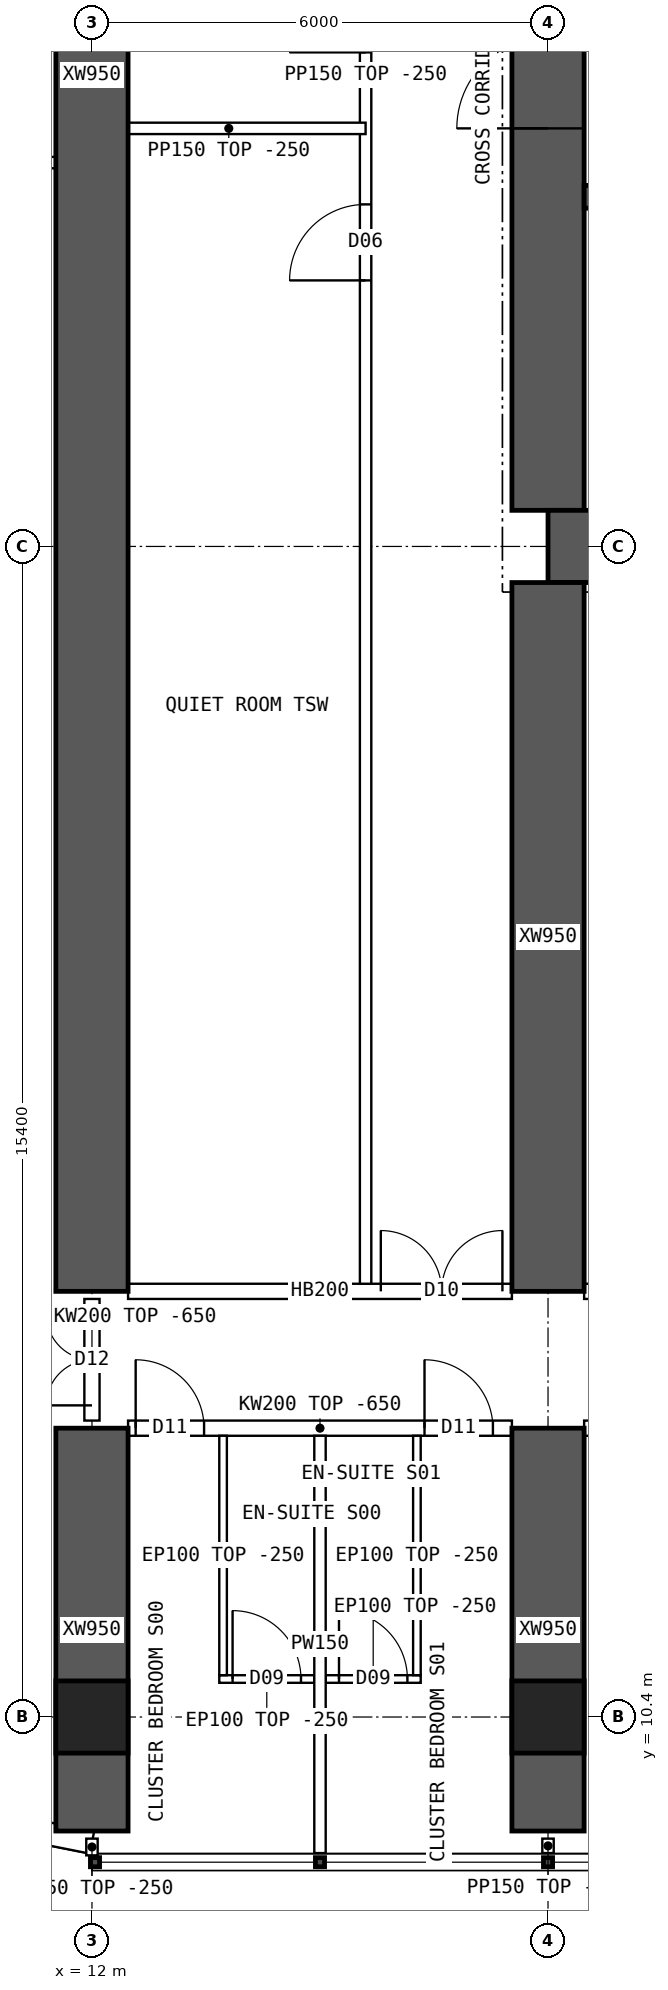
"""IFC4 building model, lengths in metres.
Left out: names, types, materials, properties, quantities, classifications, styles, units other than length and angle.
Written with IfcOpenShell. Run it as: python <this file> out.ifc"""

import sys

from ifc_helpers import new_model, si_unit, direction, frame, frame_2d, origin, origin_2d, place, context, subcontext, project, spatial, polyline, rectangle, hollow_rectangle, outline, extrude, element, fill, save


model = new_model("IFC4")
c1 = context("Model", 3, precision=1e-05, world=origin(), true_north=direction((0.0, 1.0)))
c2 = subcontext(c1, "Body", "Model", "MODEL_VIEW")
j1 = project(units=[si_unit("LENGTHUNIT", "METRE"), si_unit("PLANEANGLEUNIT", "RADIAN")], contexts=[c1])
p1 = place(None, origin())
s1 = spatial("IfcSite", under=j1, at=p1, CompositionType="ELEMENT")
p2 = place(p1, origin())
s2 = spatial("IfcBuilding", under=s1, at=p2, CompositionType="ELEMENT")
p3 = place(p2, frame((0.0, 0.0, 114.4)))
s3 = spatial("IfcBuildingStorey", under=s2, at=p3, CompositionType="ELEMENT", Elevation=114.4)
for number, where, z_axis, x_axis in (
    (1, (12.0, 10.4, 0.0), (0.0, 0.0, 1.0), (1.0, 0.0, 0.0)),
    (2, (18.0, 10.4, 0.0), (0.0, 0.0, 1.0), (1.0, 0.0, 0.0)),
):
    element("IfcColumn", number, at=place(p3, frame(where, z_axis=z_axis, x_axis=x_axis)), inside=s3, PredefinedType="COLUMN", context=c2, shape_type="SweptSolid", body=[
        extrude(hollow_rectangle(XDim=0.95, YDim=0.95, WallThickness=0.095, at=origin_2d()), origin(), (0.0, 0.0, 1.0), 3.75),
    ])
p4 = place(p3, frame((18.0, 25.8, 0.0), z_axis=(0.0, 0.0, 1.0), x_axis=(1.0, 0.0, 0.0)))
e3 = element("IfcWall", 3, at=p4, inside=s3, PredefinedType="SHEAR", context=c2, shape_type="SweptSolid", body=[
    extrude(rectangle(XDim=48.0, YDim=0.95, at=frame_2d((24.0, 0.0))), origin(), (0.0, 0.0, 1.0), 3.75),
])
p5 = place(p3, frame((18.0, 26.275, 0.0), z_axis=(0.0, 0.0, 1.0), x_axis=(0.0, 1.0, 0.0)))
e4 = element("IfcWall", 4, at=p5, inside=s3, PredefinedType="SHEAR", context=c2, shape_type="SweptSolid", body=[
    extrude(rectangle(XDim=11.45, YDim=0.95, at=frame_2d((5.725, 0.0))), origin(), (0.0, 0.0, 1.0), 3.75),
])
p6 = place(p5, frame((5.025, 0.0, 0.0)))
e5 = element("IfcOpeningElement", 5, at=p6, cuts=e4, PredefinedType="OPENING", context=c2, shape_type="SweptSolid", body=[
    extrude(rectangle(XDim=1.2, YDim=2.1, at=frame_2d((0.6, 1.05))), frame((0.0, 0.485, 0.0), z_axis=(0.0, -1.0, 0.0), x_axis=(1.0, 0.0, 0.0)), (0.0, 0.0, 1.0), 0.97),
])
p7 = place(p3, frame((18.475, 30.4, 0.0), z_axis=(0.0, 0.0, 1.0), x_axis=(1.0, 0.0, 0.0)))
e6 = element("IfcWall", 6, at=p7, inside=s3, PredefinedType="SHEAR", context=c2, shape_type="SweptSolid", body=[
    extrude(rectangle(XDim=47.05, YDim=0.3, at=frame_2d((23.525, 0.0))), origin(), (0.0, 0.0, 1.0), 3.75),
])
p8 = place(p7, frame((0.4, 0.0, 0.0)))
e7 = element("IfcOpeningElement", 7, at=p8, cuts=e6, PredefinedType="OPENING", context=c2, shape_type="SweptSolid", body=[
    extrude(rectangle(XDim=1.0, YDim=2.1, at=frame_2d((0.5, 1.05))), frame((0.0, 0.16, 0.0), z_axis=(0.0, -1.0, 0.0), x_axis=(1.0, 0.0, 0.0)), (0.0, 0.0, 1.0), 0.32),
])
p9 = place(p7, frame((45.65, 0.0, 0.0)))
e8 = element("IfcOpeningElement", 8, at=p9, cuts=e6, PredefinedType="OPENING", context=c2, shape_type="SweptSolid", body=[
    extrude(rectangle(XDim=1.0, YDim=2.1, at=frame_2d((0.5, 1.05))), frame((0.0, 0.16, 0.0), z_axis=(0.0, -1.0, 0.0), x_axis=(1.0, 0.0, 0.0)), (0.0, 0.0, 1.0), 0.32),
])
p10 = place(p7, frame((8.275, 0.0, 0.0)))
e9 = element("IfcOpeningElement", 9, at=p10, cuts=e6, PredefinedType="OPENING", context=c2, shape_type="SweptSolid", body=[
    extrude(rectangle(XDim=1.1, YDim=2.1, at=frame_2d((0.55, 1.05))), frame((0.0, 0.16, 0.0), z_axis=(0.0, -1.0, 0.0), x_axis=(1.0, 0.0, 0.0)), (0.0, 0.0, 1.0), 0.32),
])
p11 = place(p7, frame((10.875, 0.0, 0.0)))
e10 = element("IfcOpeningElement", 10, at=p11, cuts=e6, PredefinedType="OPENING", context=c2, shape_type="SweptSolid", body=[
    extrude(rectangle(XDim=1.1, YDim=2.1, at=frame_2d((0.55, 1.05))), frame((0.0, 0.16, 0.0), z_axis=(0.0, -1.0, 0.0), x_axis=(1.0, 0.0, 0.0)), (0.0, 0.0, 1.0), 0.32),
])
p12 = place(p7, frame((13.475, 0.0, 0.0)))
e11 = element("IfcOpeningElement", 11, at=p12, cuts=e6, PredefinedType="OPENING", context=c2, shape_type="SweptSolid", body=[
    extrude(rectangle(XDim=1.1, YDim=2.1, at=frame_2d((0.55, 1.05))), frame((0.0, 0.16, 0.0), z_axis=(0.0, -1.0, 0.0), x_axis=(1.0, 0.0, 0.0)), (0.0, 0.0, 1.0), 0.32),
])
p13 = place(p7, frame((16.075, 0.0, 0.0)))
e12 = element("IfcOpeningElement", 12, at=p13, cuts=e6, PredefinedType="OPENING", context=c2, shape_type="SweptSolid", body=[
    extrude(rectangle(XDim=1.1, YDim=2.1, at=frame_2d((0.55, 1.05))), frame((0.0, 0.16, 0.0), z_axis=(0.0, -1.0, 0.0), x_axis=(1.0, 0.0, 0.0)), (0.0, 0.0, 1.0), 0.32),
])
p14 = place(p7, frame((18.85, 0.0, 0.0)))
e13 = element("IfcOpeningElement", 13, at=p14, cuts=e6, PredefinedType="OPENING", context=c2, shape_type="SweptSolid", body=[
    extrude(rectangle(XDim=0.9, YDim=2.1, at=frame_2d((0.45, 1.05))), frame((0.0, 0.16, 0.0), z_axis=(0.0, -1.0, 0.0), x_axis=(1.0, 0.0, 0.0)), (0.0, 0.0, 1.0), 0.32),
])
p15 = place(p7, frame((30.142, 0.0, 0.0)))
e14 = element("IfcOpeningElement", 14, at=p15, cuts=e6, PredefinedType="OPENING", context=c2, shape_type="SweptSolid", body=[
    extrude(rectangle(XDim=1.1, YDim=2.1, at=frame_2d((0.55, 1.05))), frame((0.0, 0.16, 0.0), z_axis=(0.0, -1.0, 0.0), x_axis=(1.0, 0.0, 0.0)), (0.0, 0.0, 1.0), 0.32),
])
p16 = place(p7, frame((33.675, 0.0, 0.0)))
e15 = element("IfcOpeningElement", 15, at=p16, cuts=e6, PredefinedType="OPENING", context=c2, shape_type="SweptSolid", body=[
    extrude(rectangle(XDim=1.1, YDim=2.1, at=frame_2d((0.55, 1.05))), frame((0.0, 0.16, 0.0), z_axis=(0.0, -1.0, 0.0), x_axis=(1.0, 0.0, 0.0)), (0.0, 0.0, 1.0), 0.32),
])
p17 = place(p7, frame((37.208, 0.0, 0.0)))
e16 = element("IfcOpeningElement", 16, at=p17, cuts=e6, PredefinedType="OPENING", context=c2, shape_type="SweptSolid", body=[
    extrude(rectangle(XDim=1.1, YDim=2.1, at=frame_2d((0.55, 1.05))), frame((0.0, 0.16, 0.0), z_axis=(0.0, -1.0, 0.0), x_axis=(1.0, 0.0, 0.0)), (0.0, 0.0, 1.0), 0.32),
])
p18 = place(p3, frame((12.0, 8.9, 0.0), z_axis=(0.0, 0.0, 1.0), x_axis=(0.0, 1.0, 0.0)))
e17 = element("IfcWall", 17, at=p18, inside=s3, PredefinedType="SHEAR", context=c2, shape_type="SweptSolid", body=[
    extrude(rectangle(XDim=5.3, YDim=0.95, at=frame_2d((2.65, 0.0))), origin(), (0.0, 0.0, 1.0), 3.75),
])
p19 = place(p3, frame((12.0, 16.0, 0.0), z_axis=(0.0, 0.0, 1.0), x_axis=(0.0, 1.0, 0.0)))
e18 = element("IfcWall", 18, at=p19, inside=s3, PredefinedType="SHEAR", context=c2, shape_type="SweptSolid", body=[
    extrude(rectangle(XDim=32.0, YDim=0.95, at=frame_2d((16.0, 0.0))), origin(), (0.0, 0.0, 1.0), 3.75),
])
p20 = place(p3, frame((18.0, 8.9, 0.0), z_axis=(0.0, 0.0, 1.0), x_axis=(0.0, 1.0, 0.0)))
e19 = element("IfcWall", 19, at=p20, inside=s3, PredefinedType="SHEAR", context=c2, shape_type="SweptSolid", body=[
    extrude(rectangle(XDim=5.3, YDim=0.95, at=frame_2d((2.65, 0.0))), origin(), (0.0, 0.0, 1.0), 3.75),
])
p21 = place(p3, frame((18.0, 16.0, 0.0), z_axis=(0.0, 0.0, 1.0), x_axis=(0.0, 1.0, 0.0)))
e20 = element("IfcWall", 20, at=p21, inside=s3, PredefinedType="SHEAR", context=c2, shape_type="SweptSolid", body=[
    extrude(rectangle(XDim=9.325, YDim=0.95, at=frame_2d((4.663, 0.0))), origin(), (0.0, 0.0, 1.0), 3.75),
])
p22 = place(p3, frame((8.843, 9.378, 0.0), z_axis=(0.0, 0.0, 1.0), x_axis=(0.980787251524, -0.195080412259, 0.0)))
e21 = element("IfcWall", 21, at=p22, inside=s3, PredefinedType="SOLIDWALL", context=c2, shape_type="SweptSolid", body=[
    extrude(outline(polyline([(-0.03, -0.15), (3.249, -0.15), (3.189, 0.15), (0.03, 0.15), (-0.03, -0.15)])), origin(), (0.0, 0.0, 1.0), 3.5),
])
p23 = place(p22, frame((0.909, 0.0, 0.9)))
e22 = element("IfcOpeningElement", 22, at=p23, cuts=e21, PredefinedType="OPENING", context=c2, shape_type="SweptSolid", body=[
    extrude(rectangle(XDim=1.4, YDim=1.8, at=frame_2d((0.7, 0.9))), frame((0.0, 0.16, 0.0), z_axis=(0.0, -1.0, 0.0), x_axis=(1.0, 0.0, 0.0)), (0.0, 0.0, 1.0), 0.32),
])
p24 = place(p3, frame((12.475, 14.2, 0.0), z_axis=(0.0, 0.0, 1.0), x_axis=(1.0, 0.0, 0.0)))
e23 = element("IfcWall", 23, at=p24, inside=s3, PredefinedType="SOLIDWALL", context=c2, shape_type="SweptSolid", body=[
    extrude(outline(polyline([(0.0, 0.0), (5.05, 0.0), (5.05, 3.1), (0.0, 3.1), (0.0, 0.0)])), frame((0.0, 0.1, 0.0), z_axis=(0.0, -1.0, 0.0), x_axis=(1.0, 0.0, 0.0)), (0.0, 0.0, 1.0), 0.2),
])
p25 = place(p24, frame((0.1, 0.0, 0.0)))
e24 = element("IfcOpeningElement", 24, at=p25, cuts=e23, PredefinedType="OPENING", context=c2, shape_type="SweptSolid", body=[
    extrude(rectangle(XDim=0.9, YDim=2.1, at=frame_2d((0.45, 1.05))), frame((0.0, 0.11, 0.0), z_axis=(0.0, -1.0, 0.0), x_axis=(1.0, 0.0, 0.0)), (0.0, 0.0, 1.0), 0.22),
])
p26 = place(p24, frame((3.9, 0.0, 0.0)))
e25 = element("IfcOpeningElement", 25, at=p26, cuts=e23, PredefinedType="OPENING", context=c2, shape_type="SweptSolid", body=[
    extrude(rectangle(XDim=0.9, YDim=2.1, at=frame_2d((0.45, 1.05))), frame((0.0, 0.11, 0.0), z_axis=(0.0, -1.0, 0.0), x_axis=(1.0, 0.0, 0.0)), (0.0, 0.0, 1.0), 0.22),
])
p27 = place(p3, frame((12.475, 16.0, 0.0), z_axis=(0.0, 0.0, 1.0), x_axis=(1.0, 0.0, 0.0)))
e26 = element("IfcWall", 26, at=p27, inside=s3, PredefinedType="SOLIDWALL", context=c2, shape_type="SweptSolid", body=[
    extrude(rectangle(XDim=5.05, YDim=0.2, at=frame_2d((2.525, 0.0))), origin(), (0.0, 0.0, 1.0), 3.5),
])
p28 = place(p27, frame((3.325, 0.0, 0.0)))
e27 = element("IfcOpeningElement", 27, at=p28, cuts=e26, PredefinedType="OPENING", context=c2, shape_type="SweptSolid", body=[
    extrude(rectangle(XDim=1.6, YDim=2.1, at=frame_2d((0.8, 1.05))), frame((0.0, 0.11, 0.0), z_axis=(0.0, -1.0, 0.0), x_axis=(1.0, 0.0, 0.0)), (0.0, 0.0, 1.0), 0.22),
])
p29 = place(p3, frame((18.475, 14.2, 0.0), z_axis=(0.0, 0.0, 1.0), x_axis=(1.0, 0.0, 0.0)))
e28 = element("IfcWall", 28, at=p29, inside=s3, PredefinedType="SOLIDWALL", context=c2, shape_type="SweptSolid", body=[
    extrude(outline(polyline([(0.0, 0.0), (5.05, 0.0), (5.05, 3.1), (0.0, 3.1), (0.0, 0.0)])), frame((0.0, 0.1, 0.0), z_axis=(0.0, -1.0, 0.0), x_axis=(1.0, 0.0, 0.0)), (0.0, 0.0, 1.0), 0.2),
])
p30 = place(p29, frame((0.1, 0.0, 0.0)))
e29 = element("IfcOpeningElement", 29, at=p30, cuts=e28, PredefinedType="OPENING", context=c2, shape_type="SweptSolid", body=[
    extrude(rectangle(XDim=0.9, YDim=2.1, at=frame_2d((0.45, 1.05))), frame((0.0, 0.11, 0.0), z_axis=(0.0, -1.0, 0.0), x_axis=(1.0, 0.0, 0.0)), (0.0, 0.0, 1.0), 0.22),
])
p31 = place(p29, frame((3.9, 0.0, 0.0)))
e30 = element("IfcOpeningElement", 30, at=p31, cuts=e28, PredefinedType="OPENING", context=c2, shape_type="SweptSolid", body=[
    extrude(rectangle(XDim=0.9, YDim=2.1, at=frame_2d((0.45, 1.05))), frame((0.0, 0.11, 0.0), z_axis=(0.0, -1.0, 0.0), x_axis=(1.0, 0.0, 0.0)), (0.0, 0.0, 1.0), 0.22),
])
p32 = place(p3, frame((18.475, 16.0, 0.0), z_axis=(0.0, 0.0, 1.0), x_axis=(1.0, 0.0, 0.0)))
e31 = element("IfcWall", 31, at=p32, inside=s3, PredefinedType="SOLIDWALL", context=c2, shape_type="SweptSolid", body=[
    extrude(rectangle(XDim=5.05, YDim=0.2, at=frame_2d((2.525, 0.0))), origin(), (0.0, 0.0, 1.0), 3.5),
])
p33 = place(p32, frame((0.35, 0.0, 0.0)))
e32 = element("IfcOpeningElement", 32, at=p33, cuts=e31, PredefinedType="OPENING", context=c2, shape_type="SweptSolid", body=[
    extrude(rectangle(XDim=0.9, YDim=2.1, at=frame_2d((0.45, 1.05))), frame((0.0, 0.11, 0.0), z_axis=(0.0, -1.0, 0.0), x_axis=(1.0, 0.0, 0.0)), (0.0, 0.0, 1.0), 0.22),
])
p34 = place(p32, frame((3.105, 0.0, 0.0)))
e33 = element("IfcOpeningElement", 33, at=p34, cuts=e31, PredefinedType="OPENING", context=c2, shape_type="SweptSolid", body=[
    extrude(rectangle(XDim=0.9, YDim=2.1, at=frame_2d((0.45, 1.05))), frame((0.0, 0.11, 0.0), z_axis=(0.0, -1.0, 0.0), x_axis=(1.0, 0.0, 0.0)), (0.0, 0.0, 1.0), 0.22),
])
p35 = place(p3, frame((15.0, 8.61, 0.0), z_axis=(0.0, 0.0, 1.0), x_axis=(0.0, 1.0, 0.0)))
e34 = element("IfcWall", 34, at=p35, inside=s3, PredefinedType="PARTITIONING", context=c2, shape_type="SweptSolid", body=[
    extrude(outline(polyline([(0.0, 0.0), (5.49, 0.0), (5.49, 3.1), (5.442, 3.1), (5.44, 3.5), (1.992, 3.5), (1.99, 3.1), (1.592, 3.1), (1.59, 3.5), (0.0, 3.5), (0.0, 0.0)])), frame((0.0, 0.075, 0.0), z_axis=(0.0, -1.0, 0.0), x_axis=(1.0, 0.0, 0.0)), (0.0, 0.0, 1.0), 0.15),
])
p36 = place(p3, frame((14.925, 10.9, 0.0), z_axis=(0.0, 0.0, 1.0), x_axis=(-1.0, 0.0, 0.0)))
e35 = element("IfcWall", 35, at=p36, inside=s3, PredefinedType="PARTITIONING", context=c2, shape_type="SweptSolid", body=[
    extrude(rectangle(XDim=1.25, YDim=0.1, at=frame_2d((0.625, 0.0))), origin(), (0.0, 0.0, 1.0), 3.5),
])
p37 = place(p36, frame((0.175, 0.0, 0.0)))
e36 = element("IfcOpeningElement", 36, at=p37, cuts=e35, PredefinedType="OPENING", context=c2, shape_type="SweptSolid", body=[
    extrude(rectangle(XDim=0.9, YDim=2.1, at=frame_2d((0.45, 1.05))), frame((0.0, 0.06, 0.0), z_axis=(0.0, -1.0, 0.0), x_axis=(1.0, 0.0, 0.0)), (0.0, 0.0, 1.0), 0.12),
])
p38 = place(p3, frame((13.725, 10.95, 0.0), z_axis=(0.0, 0.0, 1.0), x_axis=(0.0, 1.0, 0.0)))
e37 = element("IfcWall", 37, at=p38, inside=s3, PredefinedType="PARTITIONING", context=c2, shape_type="SweptSolid", body=[
    extrude(outline(polyline([(0.0, 0.0), (3.15, 0.0), (3.15, 3.1), (3.102, 3.1), (3.1, 3.5), (0.0, 3.5), (0.0, 0.0)])), frame((0.0, 0.05, 0.0), z_axis=(0.0, -1.0, 0.0), x_axis=(1.0, 0.0, 0.0)), (0.0, 0.0, 1.0), 0.1),
])
p39 = place(p3, frame((16.325, 10.9, 0.0), z_axis=(0.0, 0.0, 1.0), x_axis=(-1.0, 0.0, 0.0)))
e38 = element("IfcWall", 38, at=p39, inside=s3, PredefinedType="PARTITIONING", context=c2, shape_type="SweptSolid", body=[
    extrude(rectangle(XDim=1.25, YDim=0.1, at=frame_2d((0.625, 0.0))), origin(), (0.0, 0.0, 1.0), 3.5),
])
p40 = place(p39, frame((0.175, 0.0, 0.0)))
e39 = element("IfcOpeningElement", 39, at=p40, cuts=e38, PredefinedType="OPENING", context=c2, shape_type="SweptSolid", body=[
    extrude(rectangle(XDim=0.9, YDim=2.1, at=frame_2d((0.45, 1.05))), frame((0.0, 0.06, 0.0), z_axis=(0.0, -1.0, 0.0), x_axis=(1.0, 0.0, 0.0)), (0.0, 0.0, 1.0), 0.12),
])
p41 = place(p3, frame((16.275, 10.95, 0.0), z_axis=(0.0, 0.0, 1.0), x_axis=(0.0, 1.0, 0.0)))
e40 = element("IfcWall", 40, at=p41, inside=s3, PredefinedType="PARTITIONING", context=c2, shape_type="SweptSolid", body=[
    extrude(outline(polyline([(0.0, 0.0), (3.15, 0.0), (3.15, 3.1), (3.102, 3.1), (3.1, 3.5), (0.0, 3.5), (0.0, 0.0)])), frame((0.0, 0.05, 0.0), z_axis=(0.0, -1.0, 0.0), x_axis=(1.0, 0.0, 0.0)), (0.0, 0.0, 1.0), 0.1),
])
p42 = place(p3, frame((15.6, 16.1, 0.0), z_axis=(0.0, 0.0, 1.0), x_axis=(0.0, 1.0, 0.0)))
e41 = element("IfcWall", 41, at=p42, inside=s3, PredefinedType="PARTITIONING", context=c2, shape_type="SweptSolid", body=[
    extrude(rectangle(XDim=31.8, YDim=0.15, at=frame_2d((15.9, 0.0))), origin(), (0.0, 0.0, 1.0), 3.5),
])
p43 = place(p42, frame((13.2, 0.0, 0.0)))
e42 = element("IfcOpeningElement", 42, at=p43, cuts=e41, PredefinedType="OPENING", context=c2, shape_type="SweptSolid", body=[
    extrude(rectangle(XDim=1.0, YDim=2.1, at=frame_2d((0.5, 1.05))), frame((0.0, 0.085, 0.0), z_axis=(0.0, -1.0, 0.0), x_axis=(1.0, 0.0, 0.0)), (0.0, 0.0, 1.0), 0.17),
])
p44 = place(p42, frame((16.2, 0.0, 0.0)))
e43 = element("IfcOpeningElement", 43, at=p44, cuts=e41, PredefinedType="OPENING", context=c2, shape_type="SweptSolid", body=[
    extrude(rectangle(XDim=1.0, YDim=2.1, at=frame_2d((0.5, 1.05))), frame((0.0, 0.085, 0.0), z_axis=(0.0, -1.0, 0.0), x_axis=(1.0, 0.0, 0.0)), (0.0, 0.0, 1.0), 0.17),
])
p45 = place(p3, frame((12.0, 31.3, 0.0), z_axis=(0.0, 0.0, 1.0), x_axis=(1.0, 0.0, 0.0)))
e44 = element("IfcWall", 44, at=p45, inside=s3, PredefinedType="PARTITIONING", context=c2, shape_type="SweptSolid", body=[
    extrude(rectangle(XDim=3.6, YDim=0.15, at=frame_2d((1.8, 0.0))), origin(), (0.0, 0.0, 1.0), 3.5),
])
p46 = place(p3, frame((3.905, 30.85, 0.0), z_axis=(0.0, 0.0, 1.0), x_axis=(1.0, 0.0, 0.0)))
e45 = element("IfcWall", 45, at=p46, inside=s3, PredefinedType="PARTITIONING", context=c2, shape_type="SweptSolid", body=[
    extrude(outline(polyline([(0.0, 0.0), (8.02, 0.0), (8.02, 3.5), (2.397, 3.5), (2.395, 3.05), (1.797, 3.05), (1.795, 3.5), (0.0, 3.5), (0.0, 0.0)])), frame((0.0, 0.075, 0.0), z_axis=(0.0, -1.0, 0.0), x_axis=(1.0, 0.0, 0.0)), (0.0, 0.0, 1.0), 0.15),
])
p47 = place(p3, frame((12.0, 14.3, 0.0), z_axis=(0.0, 0.0, 1.0), x_axis=(0.0, 1.0, 0.0)))
e46 = element("IfcWall", 46, at=p47, inside=s3, PredefinedType="SOLIDWALL", context=c2, shape_type="SweptSolid", body=[
    extrude(outline(polyline([(0.0, 0.0), (1.6, 0.0), (1.6, 3.1), (0.0, 3.1), (0.0, 0.0)])), frame((0.0, 0.1, 0.0), z_axis=(0.0, -1.0, 0.0), x_axis=(1.0, 0.0, 0.0)), (0.0, 0.0, 1.0), 0.2),
])
p48 = place(p47, frame((0.2, 0.0, 0.0)))
e47 = element("IfcOpeningElement", 47, at=p48, cuts=e46, PredefinedType="OPENING", context=c2, shape_type="SweptSolid", body=[
    extrude(rectangle(XDim=1.2, YDim=2.1, at=frame_2d((0.6, 1.05))), frame((0.0, 0.11, 0.0), z_axis=(0.0, -1.0, 0.0), x_axis=(1.0, 0.0, 0.0)), (0.0, 0.0, 1.0), 0.22),
])
p49 = place(p3, frame((12.0, 8.8, 0.0), z_axis=(0.0, 0.0, 1.0), x_axis=(0.0, -1.0, 0.0)))
e48 = element("IfcWall", 48, at=p49, inside=s3, PredefinedType="PARTITIONING", context=c2, shape_type="SweptSolid", body=[
    extrude(rectangle(XDim=0.22, YDim=0.15, at=frame_2d((0.11, 0.0))), origin(), (0.0, 0.0, 1.0), 3.5),
])
p50 = place(p3, frame((18.0, 8.8, 0.0), z_axis=(0.0, 0.0, 1.0), x_axis=(0.0, -1.0, 0.0)))
e49 = element("IfcWall", 49, at=p50, inside=s3, PredefinedType="PARTITIONING", context=c2, shape_type="SweptSolid", body=[
    extrude(rectangle(XDim=0.19, YDim=0.15, at=frame_2d((0.095, 0.0))), origin(), (0.0, 0.0, 1.0), 3.5),
])
p51 = place(p6, origin())
e50 = element("IfcDoor", 50, at=p51, inside=s3, OperationType="SINGLE_SWING_LEFT", PredefinedType="DOOR", context=c2, shape_type="SweptSolid", body=[
    extrude(rectangle(XDim=1.2, YDim=2.1, at=frame_2d((0.6, 1.05))), frame((0.0, 0.025, 0.0), z_axis=(0.0, -1.0, 0.0), x_axis=(1.0, 0.0, 0.0)), (0.0, 0.0, 1.0), 0.05),
])
fill(e5, e50)
p52 = place(p28, origin())
e51 = element("IfcDoor", 51, at=p52, inside=s3, OperationType="DOUBLE_DOOR_SINGLE_SWING", PredefinedType="DOOR", context=c2, shape_type="SweptSolid", body=[
    extrude(rectangle(XDim=1.6, YDim=2.1, at=frame_2d((0.8, 1.05))), frame((0.0, 0.025, 0.0), z_axis=(0.0, -1.0, 0.0), x_axis=(1.0, 0.0, 0.0)), (0.0, 0.0, 1.0), 0.05),
])
fill(e27, e51)
p53 = place(p37, origin())
e52 = element("IfcDoor", 52, at=p53, inside=s3, OperationType="SINGLE_SWING_RIGHT", PredefinedType="DOOR", context=c2, shape_type="SweptSolid", body=[
    extrude(rectangle(XDim=0.9, YDim=2.1, at=frame_2d((0.45, 1.05))), frame((0.0, 0.025, 0.0), z_axis=(0.0, -1.0, 0.0), x_axis=(1.0, 0.0, 0.0)), (0.0, 0.0, 1.0), 0.05),
])
fill(e36, e52)
p54 = place(p25, origin())
e53 = element("IfcDoor", 53, at=p54, inside=s3, OperationType="SINGLE_SWING_LEFT", PredefinedType="DOOR", context=c2, shape_type="SweptSolid", body=[
    extrude(rectangle(XDim=0.9, YDim=2.1, at=frame_2d((0.45, 1.05))), frame((0.0, 0.025, 0.0), z_axis=(0.0, -1.0, 0.0), x_axis=(1.0, 0.0, 0.0)), (0.0, 0.0, 1.0), 0.05),
])
fill(e24, e53)
p55 = place(p40, origin())
e54 = element("IfcDoor", 54, at=p55, inside=s3, OperationType="SINGLE_SWING_RIGHT", PredefinedType="DOOR", context=c2, shape_type="SweptSolid", body=[
    extrude(rectangle(XDim=0.9, YDim=2.1, at=frame_2d((0.45, 1.05))), frame((0.0, 0.025, 0.0), z_axis=(0.0, -1.0, 0.0), x_axis=(1.0, 0.0, 0.0)), (0.0, 0.0, 1.0), 0.05),
])
fill(e39, e54)
p56 = place(p26, origin())
e55 = element("IfcDoor", 55, at=p56, inside=s3, OperationType="SINGLE_SWING_LEFT", PredefinedType="DOOR", context=c2, shape_type="SweptSolid", body=[
    extrude(rectangle(XDim=0.9, YDim=2.1, at=frame_2d((0.45, 1.05))), frame((0.0, 0.025, 0.0), z_axis=(0.0, -1.0, 0.0), x_axis=(1.0, 0.0, 0.0)), (0.0, 0.0, 1.0), 0.05),
])
fill(e25, e55)
p57 = place(p43, origin())
e56 = element("IfcDoor", 56, at=p57, inside=s3, OperationType="SINGLE_SWING_LEFT", PredefinedType="DOOR", context=c2, shape_type="SweptSolid", body=[
    extrude(rectangle(XDim=1.0, YDim=2.1, at=frame_2d((0.5, 1.05))), frame((0.0, 0.025, 0.0), z_axis=(0.0, -1.0, 0.0), x_axis=(1.0, 0.0, 0.0)), (0.0, 0.0, 1.0), 0.05),
])
fill(e42, e56)
p58 = place(p48, origin())
e57 = element("IfcDoor", 57, at=p58, inside=s3, OperationType="DOUBLE_DOOR_SINGLE_SWING", PredefinedType="DOOR", context=c2, shape_type="SweptSolid", body=[
    extrude(rectangle(XDim=1.2, YDim=2.1, at=frame_2d((0.6, 1.05))), frame((0.0, 0.025, 0.0), z_axis=(0.0, -1.0, 0.0), x_axis=(1.0, 0.0, 0.0)), (0.0, 0.0, 1.0), 0.05),
])
fill(e47, e57)
save(model, sys.argv[1])
